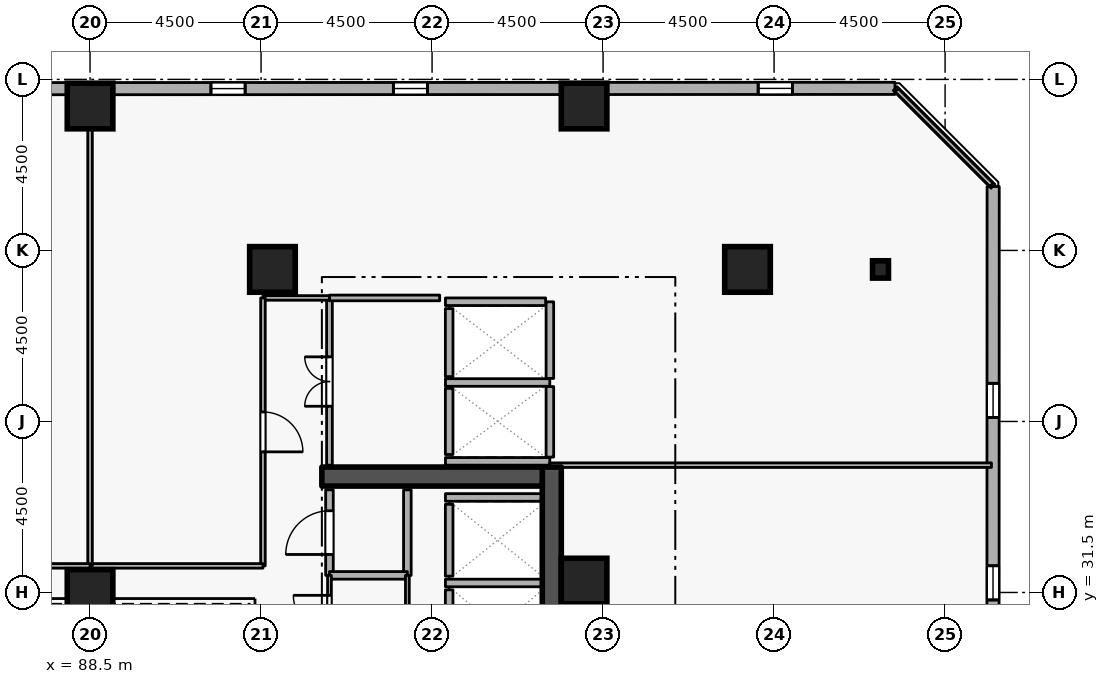
"""IFC4 building model, lengths in metres.
Left out: names, types, materials, properties, quantities, classifications, styles, units other than length and angle.
Written with IfcOpenShell. Run it as: python <this file> out.ifc"""

import sys

from ifc_helpers import new_model, si_unit, direction, frame, frame_2d, origin, origin_2d, place, context, subcontext, project, spatial, rectangle, i_section, extrude, element, fill, save


model = new_model("IFC4")
c1 = context("Model", 3, precision=1e-05, world=origin(), true_north=direction((0.0, 1.0)))
c2 = subcontext(c1, "Body", "Model", "MODEL_VIEW")
j1 = project(units=[si_unit("LENGTHUNIT", "METRE"), si_unit("PLANEANGLEUNIT", "RADIAN")], contexts=[c1])
p1 = place(None, origin())
s1 = spatial("IfcSite", under=j1, at=p1, CompositionType="ELEMENT")
p2 = place(p1, origin())
s2 = spatial("IfcBuilding", under=s1, at=p2, CompositionType="ELEMENT")
p3 = place(p2, frame((0.0, 0.0, 119.7)))
s3 = spatial("IfcBuildingStorey", under=s2, at=p3, CompositionType="ELEMENT", Elevation=119.7)
p4 = place(p3, frame((100.65, 19.2, 0.0), z_axis=(0.0, 0.0, 1.0), x_axis=(0.0, 1.0, 0.0)))
e1 = element("IfcWall", 1, at=p4, inside=s3, PredefinedType="SHEAR", context=c2, shape_type="SweptSolid", body=[
    extrude(rectangle(XDim=15.6, YDim=0.5, at=frame_2d((7.8, 0.0))), origin(), (0.0, 0.0, 1.0), 3.6),
])
p5 = place(p3, frame((94.6, 34.55, 0.0), z_axis=(0.0, 0.0, 1.0), x_axis=(1.0, 0.0, 0.0)))
e2 = element("IfcWall", 2, at=p5, inside=s3, PredefinedType="SHEAR", context=c2, shape_type="SweptSolid", body=[
    extrude(rectangle(XDim=5.8, YDim=0.5, at=frame_2d((2.9, 0.0))), origin(), (0.0, 0.0, 1.0), 3.6),
])
for number, where, z_axis, x_axis in (
    (3, (105.8, 40.0, 0.0), (0.0, 0.0, 1.0), (1.0, 0.0, 0.0)),
    (4, (101.5, 44.3, 0.0), (0.0, 0.0, 1.0), (1.0, 0.0, 0.0)),
    (5, (88.5, 44.3, 0.0), (0.0, 0.0, 1.0), (1.0, 0.0, 0.0)),
    (6, (93.3, 40.0, 0.0), (0.0, 0.0, 1.0), (1.0, 0.0, 0.0)),
    (7, (101.5, 31.8, 0.0), (0.0, 0.0, 1.0), (1.0, 0.0, 0.0)),
    (8, (88.5, 31.5, 0.0), (0.0, 0.0, 1.0), (1.0, 0.0, 0.0)),
):
    element("IfcColumn", number, at=place(p3, frame(where, z_axis=z_axis, x_axis=x_axis)), inside=s3, PredefinedType="COLUMN", context=c2, shape_type="SweptSolid", body=[
        extrude(rectangle(XDim=1.2, YDim=1.2, at=origin_2d()), origin(), (0.0, 0.0, 1.0), 3.6),
    ])
p6 = place(p3, frame((109.3, 40.0, 0.0), z_axis=(0.0, 0.0, 1.0), x_axis=(1.0, 0.0, 0.0)))
e9 = element("IfcColumn", 9, at=p6, inside=s3, PredefinedType="COLUMN", context=c2, shape_type="SweptSolid", body=[
    extrude(i_section(OverallWidth=0.418, OverallDepth=0.456, WebThickness=0.042, FlangeThickness=0.067, FilletRadius=0.015, at=origin_2d()), origin(), (0.0, 0.0, 1.0), 3.6),
])
p7 = place(p3, frame((112.253, 9.404, 0.0), z_axis=(0.0, 0.0, 1.0), x_axis=(0.000364968916, 0.999999933399, 0.0)))
e10 = element("IfcWall", 10, at=p7, inside=s3, PredefinedType="STANDARD", context=c2, shape_type="SweptSolid", body=[
    extrude(rectangle(XDim=32.778, YDim=0.32, at=frame_2d((16.389, 0.0))), origin(), (0.0, 0.0, 1.0), 2.7),
])
p8 = place(p7, frame((2.7, 0.0, 0.72)))
e11 = element("IfcOpeningElement", 11, at=p8, cuts=e10, PredefinedType="OPENING", context=c2, shape_type="SweptSolid", body=[
    extrude(rectangle(XDim=0.9, YDim=1.75, at=frame_2d((0.45, 0.875))), frame((0.0, 0.17, 0.0), z_axis=(0.0, -1.0, 0.0), x_axis=(1.0, 0.0, 0.0)), (0.0, 0.0, 1.0), 0.34),
])
p9 = place(p7, frame((12.3, 0.0, 0.72)))
e12 = element("IfcOpeningElement", 12, at=p9, cuts=e10, PredefinedType="OPENING", context=c2, shape_type="SweptSolid", body=[
    extrude(rectangle(XDim=0.9, YDim=1.75, at=frame_2d((0.45, 0.875))), frame((0.0, 0.17, 0.0), z_axis=(0.0, -1.0, 0.0), x_axis=(1.0, 0.0, 0.0)), (0.0, 0.0, 1.0), 0.34),
])
p10 = place(p7, frame((17.1, 0.0, 0.72)))
e13 = element("IfcOpeningElement", 13, at=p10, cuts=e10, PredefinedType="OPENING", context=c2, shape_type="SweptSolid", body=[
    extrude(rectangle(XDim=0.9, YDim=1.75, at=frame_2d((0.45, 0.875))), frame((0.0, 0.17, 0.0), z_axis=(0.0, -1.0, 0.0), x_axis=(1.0, 0.0, 0.0)), (0.0, 0.0, 1.0), 0.34),
])
p11 = place(p7, frame((21.9, 0.0, 0.72)))
e14 = element("IfcOpeningElement", 14, at=p11, cuts=e10, PredefinedType="OPENING", context=c2, shape_type="SweptSolid", body=[
    extrude(rectangle(XDim=0.9, YDim=1.75, at=frame_2d((0.45, 0.875))), frame((0.0, 0.17, 0.0), z_axis=(0.0, -1.0, 0.0), x_axis=(1.0, 0.0, 0.0)), (0.0, 0.0, 1.0), 0.34),
])
p12 = place(p7, frame((26.7, 0.0, 0.72)))
e15 = element("IfcOpeningElement", 15, at=p12, cuts=e10, PredefinedType="OPENING", context=c2, shape_type="SweptSolid", body=[
    extrude(rectangle(XDim=0.9, YDim=1.75, at=frame_2d((0.45, 0.875))), frame((0.0, 0.17, 0.0), z_axis=(0.0, -1.0, 0.0), x_axis=(1.0, 0.0, 0.0)), (0.0, 0.0, 1.0), 0.34),
])
p13 = place(p3, frame((109.681, 44.765, 0.0), z_axis=(0.0, 0.0, 1.0), x_axis=(-0.999999933399, -0.000364968916, 0.0)))
e16 = element("IfcWall", 16, at=p13, inside=s3, PredefinedType="STANDARD", context=c2, shape_type="SweptSolid", body=[
    extrude(rectangle(XDim=32.778, YDim=0.32, at=frame_2d((16.389, 0.0))), origin(), (0.0, 0.0, 1.0), 2.7),
])
p14 = place(p13, frame((2.7, 0.0, 0.72)))
e17 = element("IfcOpeningElement", 17, at=p14, cuts=e16, PredefinedType="OPENING", context=c2, shape_type="SweptSolid", body=[
    extrude(rectangle(XDim=0.9, YDim=1.75, at=frame_2d((0.45, 0.875))), frame((0.0, 0.17, 0.0), z_axis=(0.0, -1.0, 0.0), x_axis=(1.0, 0.0, 0.0)), (0.0, 0.0, 1.0), 0.34),
])
p15 = place(p13, frame((12.3, 0.0, 0.72)))
e18 = element("IfcOpeningElement", 18, at=p15, cuts=e16, PredefinedType="OPENING", context=c2, shape_type="SweptSolid", body=[
    extrude(rectangle(XDim=0.9, YDim=1.75, at=frame_2d((0.45, 0.875))), frame((0.0, 0.17, 0.0), z_axis=(0.0, -1.0, 0.0), x_axis=(1.0, 0.0, 0.0)), (0.0, 0.0, 1.0), 0.34),
])
p16 = place(p13, frame((17.1, 0.0, 0.72)))
e19 = element("IfcOpeningElement", 19, at=p16, cuts=e16, PredefinedType="OPENING", context=c2, shape_type="SweptSolid", body=[
    extrude(rectangle(XDim=0.9, YDim=1.75, at=frame_2d((0.45, 0.875))), frame((0.0, 0.17, 0.0), z_axis=(0.0, -1.0, 0.0), x_axis=(1.0, 0.0, 0.0)), (0.0, 0.0, 1.0), 0.34),
])
p17 = place(p13, frame((26.7, 0.0, 0.72)))
e20 = element("IfcOpeningElement", 20, at=p17, cuts=e16, PredefinedType="OPENING", context=c2, shape_type="SweptSolid", body=[
    extrude(rectangle(XDim=0.9, YDim=1.75, at=frame_2d((0.45, 0.875))), frame((0.0, 0.17, 0.0), z_axis=(0.0, -1.0, 0.0), x_axis=(1.0, 0.0, 0.0)), (0.0, 0.0, 1.0), 0.34),
])
p18 = place(p3, frame((97.95, 31.57, 0.0), z_axis=(0.0, 0.0, 1.0), x_axis=(0.0, -1.0, 0.0)))
e21 = element("IfcWall", 21, at=p18, inside=s3, PredefinedType="STANDARD", context=c2, shape_type="SweptSolid", body=[
    extrude(rectangle(XDim=1.99, YDim=0.2, at=frame_2d((0.995, 0.0))), origin(), (0.0, 0.0, 1.0), 3.32),
])
p19 = place(p3, frame((97.95, 33.82, 0.0), z_axis=(0.0, 0.0, 1.0), x_axis=(0.0, -1.0, 0.0)))
e22 = element("IfcWall", 22, at=p19, inside=s3, PredefinedType="STANDARD", context=c2, shape_type="SweptSolid", body=[
    extrude(rectangle(XDim=1.89, YDim=0.2, at=frame_2d((0.945, 0.0))), origin(), (0.0, 0.0, 1.0), 3.32),
])
p20 = place(p3, frame((97.95, 36.87, 0.0), z_axis=(0.0, 0.0, 1.0), x_axis=(0.0, -1.0, 0.0)))
e23 = element("IfcWall", 23, at=p20, inside=s3, PredefinedType="STANDARD", context=c2, shape_type="SweptSolid", body=[
    extrude(rectangle(XDim=1.74, YDim=0.2, at=frame_2d((0.87, 0.0))), origin(), (0.0, 0.0, 1.0), 3.32),
])
p21 = place(p3, frame((97.95, 38.97, 0.0), z_axis=(0.0, 0.0, 1.0), x_axis=(0.0, -1.0, 0.0)))
e24 = element("IfcWall", 24, at=p21, inside=s3, PredefinedType="STANDARD", context=c2, shape_type="SweptSolid", body=[
    extrude(rectangle(XDim=1.79, YDim=0.2, at=frame_2d((0.895, 0.0))), origin(), (0.0, 0.0, 1.0), 3.32),
])
for number, where, z_axis, x_axis in (
    (25, (97.852, 31.75, 0.0), (0.0, 0.0, 1.0), (1.0, 0.0, 0.0)),
    (26, (97.852, 34.0, 0.0), (0.0, 0.0, 1.0), (1.0, 0.0, 0.0)),
):
    element("IfcWall", number, at=place(p3, frame(where, z_axis=z_axis, x_axis=x_axis)), inside=s3, PredefinedType="STANDARD", context=c2, shape_type="SweptSolid", body=[
        extrude(rectangle(XDim=2.536, YDim=0.2, at=frame_2d((1.268, 0.0))), origin(), (0.0, 0.0, 1.0), 3.32),
    ])
p22 = place(p3, frame((97.852, 37.025, 0.0), z_axis=(0.0, 0.0, 1.0), x_axis=(1.0, 0.0, 0.0)))
e27 = element("IfcWall", 27, at=p22, inside=s3, PredefinedType="STANDARD", context=c2, shape_type="SweptSolid", body=[
    extrude(rectangle(XDim=2.746, YDim=0.2, at=frame_2d((1.373, 0.0))), origin(), (0.0, 0.0, 1.0), 3.32),
])
p23 = place(p3, frame((97.852, 34.95, 0.0), z_axis=(0.0, 0.0, 1.0), x_axis=(1.0, 0.0, 0.0)))
e28 = element("IfcWall", 28, at=p23, inside=s3, PredefinedType="STANDARD", context=c2, shape_type="SweptSolid", body=[
    extrude(rectangle(XDim=2.746, YDim=0.2, at=frame_2d((1.373, 0.0))), origin(), (0.0, 0.0, 1.0), 2.525),
])
p24 = place(p3, frame((100.6, 35.062, 0.0), z_axis=(0.0, 0.0, 1.0), x_axis=(0.0, 1.0, 0.0)))
e29 = element("IfcWall", 29, at=p24, inside=s3, PredefinedType="STANDARD", context=c2, shape_type="SweptSolid", body=[
    extrude(rectangle(XDim=1.856, YDim=0.2, at=frame_2d((0.928, 0.0))), origin(), (0.0, 0.0, 1.0), 3.32),
])
p25 = place(p3, frame((100.6, 37.132, 0.0), z_axis=(0.0, 0.0, 1.0), x_axis=(0.0, 1.0, 0.0)))
e30 = element("IfcWall", 30, at=p25, inside=s3, PredefinedType="STANDARD", context=c2, shape_type="SweptSolid", body=[
    extrude(rectangle(XDim=2.016, YDim=0.2, at=frame_2d((1.008, 0.0))), origin(), (0.0, 0.0, 1.0), 3.32),
])
p26 = place(p3, frame((97.852, 39.15, 0.0), z_axis=(0.0, 0.0, 1.0), x_axis=(1.0, 0.0, 0.0)))
e31 = element("IfcWall", 31, at=p26, inside=s3, PredefinedType="STANDARD", context=c2, shape_type="SweptSolid", body=[
    extrude(rectangle(XDim=2.636, YDim=0.2, at=frame_2d((1.318, 0.0))), origin(), (0.0, 0.0, 1.0), 3.32),
])
p27 = place(p3, frame((94.8, 31.95, 0.0), z_axis=(0.0, 0.0, 1.0), x_axis=(0.0, 1.0, 0.0)))
e32 = element("IfcWall", 32, at=p27, inside=s3, PredefinedType="STANDARD", context=c2, shape_type="SweptSolid", body=[
    extrude(rectangle(XDim=2.25, YDim=0.2, at=frame_2d((1.125, 0.0))), origin(), (0.0, 0.0, 1.0), 3.32),
])
p28 = place(p27, frame((0.55, 0.0, 0.0)))
e33 = element("IfcOpeningElement", 33, at=p28, cuts=e32, PredefinedType="OPENING", context=c2, shape_type="SweptSolid", body=[
    extrude(rectangle(XDim=1.15, YDim=2.1, at=frame_2d((0.575, 1.05))), frame((0.0, 0.11, 0.0), z_axis=(0.0, -1.0, 0.0), x_axis=(1.0, 0.0, 0.0)), (0.0, 0.0, 1.0), 0.22),
])
p29 = place(p3, frame((96.85, 34.2, 0.0), z_axis=(0.0, 0.0, 1.0), x_axis=(0.0, -1.0, 0.0)))
e34 = element("IfcWall", 34, at=p29, inside=s3, PredefinedType="STANDARD", context=c2, shape_type="SweptSolid", body=[
    extrude(rectangle(XDim=2.25, YDim=0.2, at=frame_2d((1.125, 0.0))), origin(), (0.0, 0.0, 1.0), 3.32),
])
p30 = place(p3, frame((96.85, 31.95, 0.0), z_axis=(0.0, 0.0, 1.0), x_axis=(-1.0, 0.0, 0.0)))
e35 = element("IfcWall", 35, at=p30, inside=s3, PredefinedType="STANDARD", context=c2, shape_type="SweptSolid", body=[
    extrude(rectangle(XDim=2.05, YDim=0.2, at=frame_2d((1.025, 0.0))), origin(), (0.0, 0.0, 1.0), 3.32),
])
p31 = place(p3, frame((94.8, 29.95, 0.0), z_axis=(0.0, 0.0, 1.0), x_axis=(0.0, 1.0, 0.0)))
e36 = element("IfcWall", 36, at=p31, inside=s3, PredefinedType="PARTITIONING", context=c2, shape_type="SweptSolid", body=[
    extrude(rectangle(XDim=2.0, YDim=0.1, at=frame_2d((1.0, 0.0))), origin(), (0.0, 0.0, 1.0), 3.32),
])
p32 = place(p31, frame((0.525, 0.0, 0.0)))
e37 = element("IfcOpeningElement", 37, at=p32, cuts=e36, PredefinedType="OPENING", context=c2, shape_type="SweptSolid", body=[
    extrude(rectangle(XDim=0.95, YDim=2.1, at=frame_2d((0.475, 1.05))), frame((0.0, 0.06, 0.0), z_axis=(0.0, -1.0, 0.0), x_axis=(1.0, 0.0, 0.0)), (0.0, 0.0, 1.0), 0.12),
])
p33 = place(p3, frame((96.85, 31.95, 0.0), z_axis=(0.0, 0.0, 1.0), x_axis=(0.0, -1.0, 0.0)))
e38 = element("IfcWall", 38, at=p33, inside=s3, PredefinedType="PARTITIONING", context=c2, shape_type="SweptSolid", body=[
    extrude(rectangle(XDim=2.0, YDim=0.1, at=frame_2d((1.0, 0.0))), origin(), (0.0, 0.0, 1.0), 3.32),
])
p34 = place(p3, frame((94.8, 34.85, 0.0), z_axis=(0.0, 0.0, 1.0), x_axis=(0.0, 1.0, 0.0)))
e39 = element("IfcWall", 39, at=p34, inside=s3, PredefinedType="PARTITIONING", context=c2, shape_type="SweptSolid", body=[
    extrude(rectangle(XDim=4.4, YDim=0.15, at=frame_2d((2.2, 0.0))), origin(), (0.0, 0.0, 1.0), 3.32),
])
p35 = place(p34, frame((1.55, 0.0, 0.0)))
e40 = element("IfcOpeningElement", 40, at=p35, cuts=e39, PredefinedType="OPENING", context=c2, shape_type="SweptSolid", body=[
    extrude(rectangle(XDim=1.3, YDim=2.12, at=frame_2d((0.65, 1.06))), frame((0.0, 0.085, 0.0), z_axis=(0.0, -1.0, 0.0), x_axis=(1.0, 0.0, 0.0)), (0.0, 0.0, 1.0), 0.17),
])
p36 = place(p3, frame((94.8, 39.25, 0.0), z_axis=(0.0, 0.0, 1.0), x_axis=(1.0, 0.0, 0.0)))
e41 = element("IfcWall", 41, at=p36, inside=s3, PredefinedType="PARTITIONING", context=c2, shape_type="SweptSolid", body=[
    extrude(rectangle(XDim=2.9, YDim=0.15, at=frame_2d((1.45, 0.0))), origin(), (0.0, 0.0, 1.0), 3.32),
])
p37 = place(p3, frame((94.8, 39.25, 0.0), z_axis=(0.0, 0.0, 1.0), x_axis=(-1.0, 0.0, 0.0)))
e42 = element("IfcWall", 42, at=p37, inside=s3, PredefinedType="PARTITIONING", context=c2, shape_type="SweptSolid", body=[
    extrude(rectangle(XDim=1.75, YDim=0.12, at=frame_2d((0.875, 0.0))), origin(), (0.0, 0.0, 1.0), 3.32),
])
p38 = place(p3, frame((93.05, 39.25, 0.0), z_axis=(0.0, 0.0, 1.0), x_axis=(0.0, -1.0, 0.0)))
e43 = element("IfcWall", 43, at=p38, inside=s3, PredefinedType="PARTITIONING", context=c2, shape_type="SweptSolid", body=[
    extrude(rectangle(XDim=7.05, YDim=0.12, at=frame_2d((3.525, 0.0))), origin(), (0.0, 0.0, 1.0), 3.32),
])
p39 = place(p38, frame((3.0, 0.0, 0.0)))
e44 = element("IfcOpeningElement", 44, at=p39, cuts=e43, PredefinedType="OPENING", context=c2, shape_type="SweptSolid", body=[
    extrude(rectangle(XDim=1.05, YDim=2.1, at=frame_2d((0.525, 1.05))), frame((0.0, 0.07, 0.0), z_axis=(0.0, -1.0, 0.0), x_axis=(1.0, 0.0, 0.0)), (0.0, 0.0, 1.0), 0.14),
])
p40 = place(p3, frame((93.05, 32.2, 0.0), z_axis=(0.0, 0.0, 1.0), x_axis=(-1.0, 0.0, 0.0)))
e45 = element("IfcWall", 45, at=p40, inside=s3, PredefinedType="PARTITIONING", context=c2, shape_type="SweptSolid", body=[
    extrude(rectangle(XDim=4.55, YDim=0.12, at=frame_2d((2.275, 0.0))), origin(), (0.0, 0.0, 1.0), 3.32),
])
p41 = place(p3, frame((88.5, 32.2, 0.0), z_axis=(0.0, 0.0, 1.0), x_axis=(0.0, 1.0, 0.0)))
e46 = element("IfcWall", 46, at=p41, inside=s3, PredefinedType="PARTITIONING", context=c2, shape_type="SweptSolid", body=[
    extrude(rectangle(XDim=12.52, YDim=0.12, at=frame_2d((6.26, 0.0))), origin(), (0.0, 0.0, 1.0), 2.912),
])
p42 = place(p3, frame((109.725, 44.72, 0.0), z_axis=(0.0, 0.0, 1.0), x_axis=(0.707106781187, -0.707106781187, 0.0)))
e47 = element("IfcWall", 47, at=p42, inside=s3, PredefinedType="PARTITIONING", context=c2, shape_type="SweptSolid", body=[
    extrude(rectangle(XDim=3.528, YDim=0.12, at=frame_2d((1.764, 0.0))), origin(), (0.0, 0.0, 1.0), 3.32),
])
p43 = place(p3, frame((112.22, 34.85, 0.0), z_axis=(0.0, 0.0, 1.0), x_axis=(-1.0, 0.0, 0.0)))
e48 = element("IfcWall", 48, at=p43, inside=s3, PredefinedType="PARTITIONING", context=c2, shape_type="SweptSolid", body=[
    extrude(rectangle(XDim=11.622, YDim=0.12, at=frame_2d((5.811, 0.0))), origin(), (0.0, 0.0, 1.0), 2.525),
])
p44 = place(p3, frame((88.5, 32.2, 0.0), z_axis=(0.0, 0.0, 1.0), x_axis=(-1.0, 0.0, 0.0)))
e49 = element("IfcWall", 49, at=p44, inside=s3, PredefinedType="PARTITIONING", context=c2, shape_type="SweptSolid", body=[
    extrude(rectangle(XDim=4.55, YDim=0.12, at=frame_2d((2.275, 0.0))), origin(), (0.0, 0.0, 1.0), 3.32),
])
p45 = place(p11, origin())
e50 = element("IfcWindow", 50, at=p45, inside=s3, PartitioningType="SINGLE_PANEL", PredefinedType="WINDOW", context=c2, shape_type="SweptSolid", body=[
    extrude(rectangle(XDim=0.9, YDim=1.75, at=frame_2d((0.45, 0.875))), frame((0.0, 0.03, 0.0), z_axis=(0.0, -1.0, 0.0), x_axis=(1.0, 0.0, 0.0)), (0.0, 0.0, 1.0), 0.06),
])
fill(e14, e50)
p46 = place(p12, origin())
e51 = element("IfcWindow", 51, at=p46, inside=s3, PartitioningType="SINGLE_PANEL", PredefinedType="WINDOW", context=c2, shape_type="SweptSolid", body=[
    extrude(rectangle(XDim=0.9, YDim=1.75, at=frame_2d((0.45, 0.875))), frame((0.0, 0.03, 0.0), z_axis=(0.0, -1.0, 0.0), x_axis=(1.0, 0.0, 0.0)), (0.0, 0.0, 1.0), 0.06),
])
fill(e15, e51)
p47 = place(p14, origin())
e52 = element("IfcWindow", 52, at=p47, inside=s3, PartitioningType="SINGLE_PANEL", PredefinedType="WINDOW", context=c2, shape_type="SweptSolid", body=[
    extrude(rectangle(XDim=0.9, YDim=1.75, at=frame_2d((0.45, 0.875))), frame((0.0, 0.03, 0.0), z_axis=(0.0, -1.0, 0.0), x_axis=(1.0, 0.0, 0.0)), (0.0, 0.0, 1.0), 0.06),
])
fill(e17, e52)
p48 = place(p15, origin())
e53 = element("IfcWindow", 53, at=p48, inside=s3, PartitioningType="SINGLE_PANEL", PredefinedType="WINDOW", context=c2, shape_type="SweptSolid", body=[
    extrude(rectangle(XDim=0.9, YDim=1.75, at=frame_2d((0.45, 0.875))), frame((0.0, 0.03, 0.0), z_axis=(0.0, -1.0, 0.0), x_axis=(1.0, 0.0, 0.0)), (0.0, 0.0, 1.0), 0.06),
])
fill(e18, e53)
p49 = place(p16, origin())
e54 = element("IfcWindow", 54, at=p49, inside=s3, PartitioningType="SINGLE_PANEL", PredefinedType="WINDOW", context=c2, shape_type="SweptSolid", body=[
    extrude(rectangle(XDim=0.9, YDim=1.75, at=frame_2d((0.45, 0.875))), frame((0.0, 0.03, 0.0), z_axis=(0.0, -1.0, 0.0), x_axis=(1.0, 0.0, 0.0)), (0.0, 0.0, 1.0), 0.06),
])
fill(e19, e54)
p50 = place(p32, origin())
e55 = element("IfcDoor", 55, at=p50, inside=s3, OperationType="SINGLE_SWING_RIGHT", PredefinedType="DOOR", context=c2, shape_type="SweptSolid", body=[
    extrude(rectangle(XDim=0.95, YDim=2.1, at=frame_2d((0.475, 1.05))), frame((0.0, 0.025, 0.0), z_axis=(0.0, -1.0, 0.0), x_axis=(1.0, 0.0, 0.0)), (0.0, 0.0, 1.0), 0.05),
])
fill(e37, e55)
p51 = place(p28, origin())
e56 = element("IfcDoor", 56, at=p51, inside=s3, OperationType="SINGLE_SWING_LEFT", PredefinedType="DOOR", context=c2, shape_type="SweptSolid", body=[
    extrude(rectangle(XDim=1.15, YDim=2.1, at=frame_2d((0.575, 1.05))), frame((0.0, 0.025, 0.0), z_axis=(0.0, -1.0, 0.0), x_axis=(1.0, 0.0, 0.0)), (0.0, 0.0, 1.0), 0.05),
])
fill(e33, e56)
p52 = place(p35, origin())
e57 = element("IfcDoor", 57, at=p52, inside=s3, OperationType="DOUBLE_DOOR_SINGLE_SWING", PredefinedType="DOOR", context=c2, shape_type="SweptSolid", body=[
    extrude(rectangle(XDim=1.3, YDim=2.12, at=frame_2d((0.65, 1.06))), frame((0.0, 0.025, 0.0), z_axis=(0.0, -1.0, 0.0), x_axis=(1.0, 0.0, 0.0)), (0.0, 0.0, 1.0), 0.05),
])
fill(e40, e57)
p53 = place(p39, origin())
e58 = element("IfcDoor", 58, at=p53, inside=s3, OperationType="SINGLE_SWING_RIGHT", PredefinedType="DOOR", context=c2, shape_type="SweptSolid", body=[
    extrude(rectangle(XDim=1.05, YDim=2.1, at=frame_2d((0.525, 1.05))), frame((0.0, 0.025, 0.0), z_axis=(0.0, -1.0, 0.0), x_axis=(1.0, 0.0, 0.0)), (0.0, 0.0, 1.0), 0.05),
])
fill(e44, e58)
save(model, sys.argv[1])
